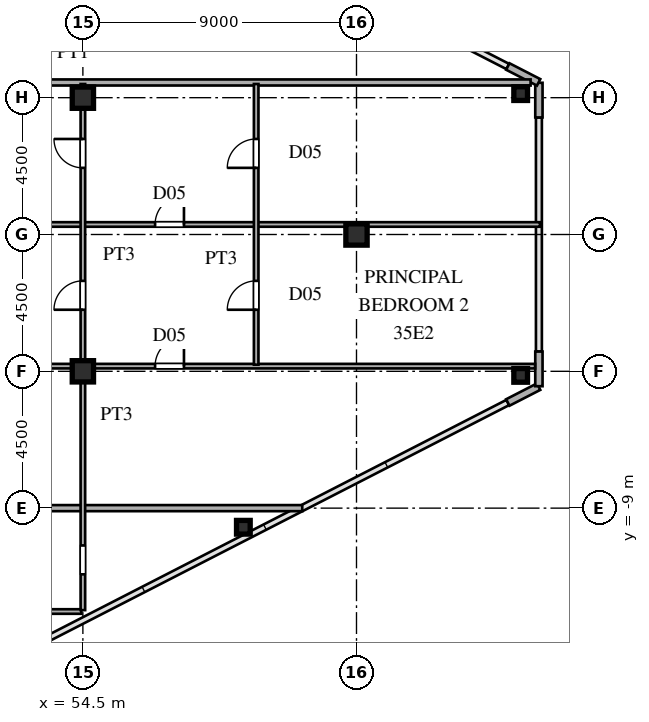
"""IFC4 building model, lengths in metres.
Left out: names, types, materials, properties, quantities, classifications, styles, units other than length and angle.
Written with IfcOpenShell. Run it as: python <this file> out.ifc"""

import sys

from ifc_helpers import new_model, si_unit, direction, frame, frame_2d, origin, origin_2d, place, context, subcontext, project, spatial, rectangle, hollow_rectangle, i_section, extrude, source, transform, mapped, element, fill, save


model = new_model("IFC4")
c1 = context("Model", 3, precision=1e-05, world=origin(), true_north=direction((0.0, 1.0)))
c2 = subcontext(c1, "Body", "Model", "MODEL_VIEW")
j1 = project(units=[si_unit("LENGTHUNIT", "METRE"), si_unit("PLANEANGLEUNIT", "RADIAN")], contexts=[c1])
p1 = place(None, origin())
s1 = spatial("IfcSite", under=j1, at=p1, CompositionType="ELEMENT")
p2 = place(p1, origin())
s2 = spatial("IfcBuilding", under=s1, at=p2, CompositionType="ELEMENT")
p3 = place(p2, frame((0.0, 0.0, 132.0)))
s3 = spatial("IfcBuildingStorey", under=s2, at=p3, CompositionType="ELEMENT", Elevation=132.0)
m1 = source(origin(), c2, "Body", "SweptSolid", [
    extrude(i_section(OverallWidth=0.7, OverallDepth=0.7, WebThickness=0.028, FlangeThickness=0.045, at=origin_2d()), origin(), (0.0, 0.0, 1.0), 3.6),
])
for number, where, z_axis, x_axis in (
    (1, (54.5, -4.5, 0.0), (0.0, 0.0, 1.0), (1.0, 0.0, 0.0)),
    (2, (54.5, 4.5, 0.0), (0.0, 0.0, 1.0), (1.0, 0.0, 0.0)),
    (3, (63.5, 0.0, 0.0), (0.0, 0.0, 1.0), (1.0, 0.0, 0.0)),
):
    element("IfcColumn", number, at=place(p3, frame(where, z_axis=z_axis, x_axis=x_axis)), inside=s3, PredefinedType="COLUMN", context=c2, shape_type="MappedRepresentation", body=[
        mapped(m1, transform((0.0, 0.0, 0.0), scale=1.0)),
    ])
m2 = source(origin(), c2, "Body", "SweptSolid", [
    extrude(hollow_rectangle(XDim=0.45, YDim=0.45, WallThickness=0.018, at=origin_2d()), origin(), (0.0, 0.0, 1.0), 3.6),
])
for number, where, z_axis, x_axis in (
    (4, (68.9, -4.634, 0.0), (0.0, 0.0, 1.0), (1.0, 0.0, 0.0)),
    (5, (68.9, 4.634, 0.0), (0.0, 0.0, 1.0), (1.0, 0.0, 0.0)),
    (6, (59.779, -9.629, 0.0), (0.0, 0.0, 1.0), (1.0, 0.0, 0.0)),
):
    element("IfcColumn", number, at=place(p3, frame(where, z_axis=z_axis, x_axis=x_axis)), inside=s3, PredefinedType="COLUMN", context=c2, shape_type="MappedRepresentation", body=[
        mapped(m2, transform((0.0, 0.0, 0.0), scale=1.0)),
    ])
p4 = place(p3, frame((68.477, -5.525, 0.0), z_axis=(0.0, 0.0, 1.0), x_axis=(0.889797395748, 0.456355776255, 0.0)))
e7 = element("IfcWall", 7, at=p4, inside=s3, PredefinedType="SOLIDWALL", context=c2, shape_type="SweptSolid", body=[
    extrude(rectangle(XDim=1.14, YDim=0.24, at=frame_2d((0.57, 0.0))), origin(), (0.0, 0.0, 1.0), 3.34),
])
for number, where, z_axis, x_axis in (
    (8, (69.5, -4.99, 0.0), (0.0, 0.0, 1.0), (0.0, 1.0, 0.0)),
    (9, (69.5, 3.85, 0.0), (0.0, 0.0, 1.0), (0.0, 1.0, 0.0)),
):
    element("IfcWall", number, at=place(p3, frame(where, z_axis=z_axis, x_axis=x_axis)), inside=s3, PredefinedType="SOLIDWALL", context=c2, shape_type="SweptSolid", body=[
        extrude(rectangle(XDim=1.14, YDim=0.24, at=frame_2d((0.57, 0.0))), origin(), (0.0, 0.0, 1.0), 3.34),
    ])
p5 = place(p3, frame((69.491, 5.005, 0.0), z_axis=(0.0, 0.0, 1.0), x_axis=(-0.889797395748, 0.456355776255, 0.0)))
e10 = element("IfcWall", 10, at=p5, inside=s3, PredefinedType="SOLIDWALL", context=c2, shape_type="SweptSolid", body=[
    extrude(rectangle(XDim=1.14, YDim=0.24, at=frame_2d((0.57, 0.0))), origin(), (0.0, 0.0, 1.0), 3.34),
])
p6 = place(p3, frame((41.85, -12.4, 0.0), z_axis=(0.0, 0.0, 1.0), x_axis=(1.0, 0.0, 0.0)))
e11 = element("IfcWall", 11, at=p6, inside=s3, PredefinedType="PARTITIONING", context=c2, shape_type="SweptSolid", body=[
    extrude(rectangle(XDim=12.6, YDim=0.15, at=frame_2d((6.3, 0.0))), origin(), (0.0, 0.0, 1.0), 3.34),
])
p7 = place(p6, frame((5.825, 0.0, 0.0)))
e12 = element("IfcOpeningElement", 12, at=p7, cuts=e11, PredefinedType="OPENING", context=c2, shape_type="SweptSolid", body=[
    extrude(rectangle(XDim=0.95, YDim=2.15, at=frame_2d((0.475, 1.075))), frame((0.0, 0.085, 0.0), z_axis=(0.0, -1.0, 0.0), x_axis=(1.0, 0.0, 0.0)), (0.0, 0.0, 1.0), 0.17),
])
p8 = place(p3, frame((39.13, -9.0, 0.0), z_axis=(0.0, 0.0, 1.0), x_axis=(1.0, 0.0, 0.0)))
e13 = element("IfcWall", 13, at=p8, inside=s3, PredefinedType="PARTITIONING", context=c2, shape_type="SweptSolid", body=[
    extrude(rectangle(XDim=22.586, YDim=0.2, at=frame_2d((11.293, 0.0))), origin(), (0.0, 0.0, 1.0), 3.34),
])
p9 = place(p3, frame((41.85, -4.33, 0.0), z_axis=(0.0, 0.0, 1.0), x_axis=(1.0, 0.0, 0.0)))
e14 = element("IfcWall", 14, at=p9, inside=s3, PredefinedType="PARTITIONING", context=c2, shape_type="SweptSolid", body=[
    extrude(rectangle(XDim=27.525, YDim=0.15, at=frame_2d((13.762, 0.0))), origin(), (0.0, 0.0, 1.0), 3.34),
])
p10 = place(p9, frame((2.214, 0.0, 0.0)))
e15 = element("IfcOpeningElement", 15, at=p10, cuts=e14, PredefinedType="OPENING", context=c2, shape_type="SweptSolid", body=[
    extrude(rectangle(XDim=0.95, YDim=2.15, at=frame_2d((0.475, 1.075))), frame((0.0, 0.085, 0.0), z_axis=(0.0, -1.0, 0.0), x_axis=(1.0, 0.0, 0.0)), (0.0, 0.0, 1.0), 0.17),
])
p11 = place(p9, frame((15.025, 0.0, 0.0)))
e16 = element("IfcOpeningElement", 16, at=p11, cuts=e14, PredefinedType="OPENING", context=c2, shape_type="SweptSolid", body=[
    extrude(rectangle(XDim=0.95, YDim=2.15, at=frame_2d((0.475, 1.075))), frame((0.0, 0.085, 0.0), z_axis=(0.0, -1.0, 0.0), x_axis=(1.0, 0.0, 0.0)), (0.0, 0.0, 1.0), 0.17),
])
p12 = place(p3, frame((41.85, 0.33, 0.0), z_axis=(0.0, 0.0, 1.0), x_axis=(1.0, 0.0, 0.0)))
e17 = element("IfcWall", 17, at=p12, inside=s3, PredefinedType="PARTITIONING", context=c2, shape_type="SweptSolid", body=[
    extrude(rectangle(XDim=27.685, YDim=0.15, at=frame_2d((13.842, 0.0))), origin(), (0.0, 0.0, 1.0), 3.34),
])
p13 = place(p12, frame((2.65, 0.0, 0.0)))
e18 = element("IfcOpeningElement", 18, at=p13, cuts=e17, PredefinedType="OPENING", context=c2, shape_type="SweptSolid", body=[
    extrude(rectangle(XDim=0.95, YDim=2.15, at=frame_2d((0.475, 1.075))), frame((0.0, 0.085, 0.0), z_axis=(0.0, -1.0, 0.0), x_axis=(1.0, 0.0, 0.0)), (0.0, 0.0, 1.0), 0.17),
])
p14 = place(p12, frame((15.025, 0.0, 0.0)))
e19 = element("IfcOpeningElement", 19, at=p14, cuts=e17, PredefinedType="OPENING", context=c2, shape_type="SweptSolid", body=[
    extrude(rectangle(XDim=0.95, YDim=2.15, at=frame_2d((0.475, 1.075))), frame((0.0, 0.085, 0.0), z_axis=(0.0, -1.0, 0.0), x_axis=(1.0, 0.0, 0.0)), (0.0, 0.0, 1.0), 0.17),
])
p15 = place(p3, frame((39.13, 5.0, 0.0), z_axis=(0.0, 0.0, 1.0), x_axis=(1.0, 0.0, 0.0)))
e20 = element("IfcWall", 20, at=p15, inside=s3, PredefinedType="PARTITIONING", context=c2, shape_type="SweptSolid", body=[
    extrude(rectangle(XDim=30.096, YDim=0.2, at=frame_2d((15.048, 0.0))), origin(), (0.0, 0.0, 1.0), 3.34),
])
p16 = place(p3, frame((54.5, -12.355, 0.0), z_axis=(0.0, 0.0, 1.0), x_axis=(0.0, 1.0, 0.0)))
e21 = element("IfcWall", 21, at=p16, inside=s3, PredefinedType="PARTITIONING", context=c2, shape_type="SweptSolid", body=[
    extrude(rectangle(XDim=7.835, YDim=0.15, at=frame_2d((3.917, 0.0))), origin(), (0.0, 0.0, 1.0), 3.34),
])
p17 = place(p16, frame((1.177, 0.0, 0.0)))
e22 = element("IfcOpeningElement", 22, at=p17, cuts=e21, PredefinedType="OPENING", context=c2, shape_type="SweptSolid", body=[
    extrude(rectangle(XDim=0.95, YDim=2.15, at=frame_2d((0.475, 1.075))), frame((0.0, 0.085, 0.0), z_axis=(0.0, -1.0, 0.0), x_axis=(1.0, 0.0, 0.0)), (0.0, 0.0, 1.0), 0.17),
])
p18 = place(p3, frame((54.5, -4.52, 0.0), z_axis=(0.0, 0.0, 1.0), x_axis=(0.0, 1.0, 0.0)))
e23 = element("IfcWall", 23, at=p18, inside=s3, PredefinedType="PARTITIONING", context=c2, shape_type="SweptSolid", body=[
    extrude(rectangle(XDim=9.47, YDim=0.15, at=frame_2d((4.735, 0.0))), origin(), (0.0, 0.0, 1.0), 2.44),
])
p19 = place(p18, frame((2.045, 0.0, 0.0)))
e24 = element("IfcOpeningElement", 24, at=p19, cuts=e23, PredefinedType="OPENING", context=c2, shape_type="SweptSolid", body=[
    extrude(rectangle(XDim=0.95, YDim=2.15, at=frame_2d((0.475, 1.075))), frame((0.0, 0.085, 0.0), z_axis=(0.0, -1.0, 0.0), x_axis=(1.0, 0.0, 0.0)), (0.0, 0.0, 1.0), 0.17),
])
p20 = place(p18, frame((6.712, 0.0, 0.0)))
e25 = element("IfcOpeningElement", 25, at=p20, cuts=e23, PredefinedType="OPENING", context=c2, shape_type="SweptSolid", body=[
    extrude(rectangle(XDim=0.95, YDim=2.15, at=frame_2d((0.475, 1.075))), frame((0.0, 0.085, 0.0), z_axis=(0.0, -1.0, 0.0), x_axis=(1.0, 0.0, 0.0)), (0.0, 0.0, 1.0), 0.17),
])
p21 = place(p3, frame((60.2, -4.283, 0.0), z_axis=(0.0, 0.0, 1.0), x_axis=(0.0, 1.0, 0.0)))
e26 = element("IfcWall", 26, at=p21, inside=s3, PredefinedType="PARTITIONING", context=c2, shape_type="SweptSolid", body=[
    extrude(rectangle(XDim=9.233, YDim=0.15, at=frame_2d((4.616, 0.0))), origin(), (0.0, 0.0, 1.0), 3.34),
])
p22 = place(p21, frame((1.808, 0.0, 0.0)))
e27 = element("IfcOpeningElement", 27, at=p22, cuts=e26, PredefinedType="OPENING", context=c2, shape_type="SweptSolid", body=[
    extrude(rectangle(XDim=0.95, YDim=2.15, at=frame_2d((0.475, 1.075))), frame((0.0, 0.085, 0.0), z_axis=(0.0, -1.0, 0.0), x_axis=(1.0, 0.0, 0.0)), (0.0, 0.0, 1.0), 0.17),
])
p23 = place(p21, frame((6.475, 0.0, 0.0)))
e28 = element("IfcOpeningElement", 28, at=p23, cuts=e26, PredefinedType="OPENING", context=c2, shape_type="SweptSolid", body=[
    extrude(rectangle(XDim=0.95, YDim=2.15, at=frame_2d((0.475, 1.075))), frame((0.0, 0.085, 0.0), z_axis=(0.0, -1.0, 0.0), x_axis=(1.0, 0.0, 0.0)), (0.0, 0.0, 1.0), 0.17),
])
m3 = source(origin(), c2, "Body", "SweptSolid", [
    extrude(rectangle(XDim=0.95, YDim=2.15, at=frame_2d((0.475, 1.075))), frame((0.0, 0.025, 0.0), z_axis=(0.0, -1.0, 0.0), x_axis=(1.0, 0.0, 0.0)), (0.0, 0.0, 1.0), 0.05),
])
p24 = place(p11, origin())
e29 = element("IfcDoor", 29, at=p24, inside=s3, OperationType="SINGLE_SWING_RIGHT", PredefinedType="DOOR", context=c2, shape_type="MappedRepresentation", body=[
    mapped(m3, transform((0.0, 0.0, 0.0), scale=1.0)),
])
fill(e16, e29)
p25 = place(p14, origin())
e30 = element("IfcDoor", 30, at=p25, inside=s3, OperationType="SINGLE_SWING_RIGHT", PredefinedType="DOOR", context=c2, shape_type="MappedRepresentation", body=[
    mapped(m3, transform((0.0, 0.0, 0.0), scale=1.0)),
])
fill(e19, e30)
p26 = place(p19, origin())
e31 = element("IfcDoor", 31, at=p26, inside=s3, OperationType="SINGLE_SWING_LEFT", PredefinedType="DOOR", context=c2, shape_type="MappedRepresentation", body=[
    mapped(m3, transform((0.0, 0.0, 0.0), scale=1.0)),
])
fill(e24, e31)
p27 = place(p20, origin())
e32 = element("IfcDoor", 32, at=p27, inside=s3, OperationType="SINGLE_SWING_RIGHT", PredefinedType="DOOR", context=c2, shape_type="MappedRepresentation", body=[
    mapped(m3, transform((0.0, 0.0, 0.0), scale=1.0)),
])
fill(e25, e32)
p28 = place(p22, origin())
e33 = element("IfcDoor", 33, at=p28, inside=s3, OperationType="SINGLE_SWING_LEFT", PredefinedType="DOOR", context=c2, shape_type="MappedRepresentation", body=[
    mapped(m3, transform((0.0, 0.0, 0.0), scale=1.0)),
])
fill(e27, e33)
p29 = place(p23, origin())
e34 = element("IfcDoor", 34, at=p29, inside=s3, OperationType="SINGLE_SWING_LEFT", PredefinedType="DOOR", context=c2, shape_type="MappedRepresentation", body=[
    mapped(m3, transform((0.0, 0.0, 0.0), scale=1.0)),
])
fill(e28, e34)
save(model, sys.argv[1])
